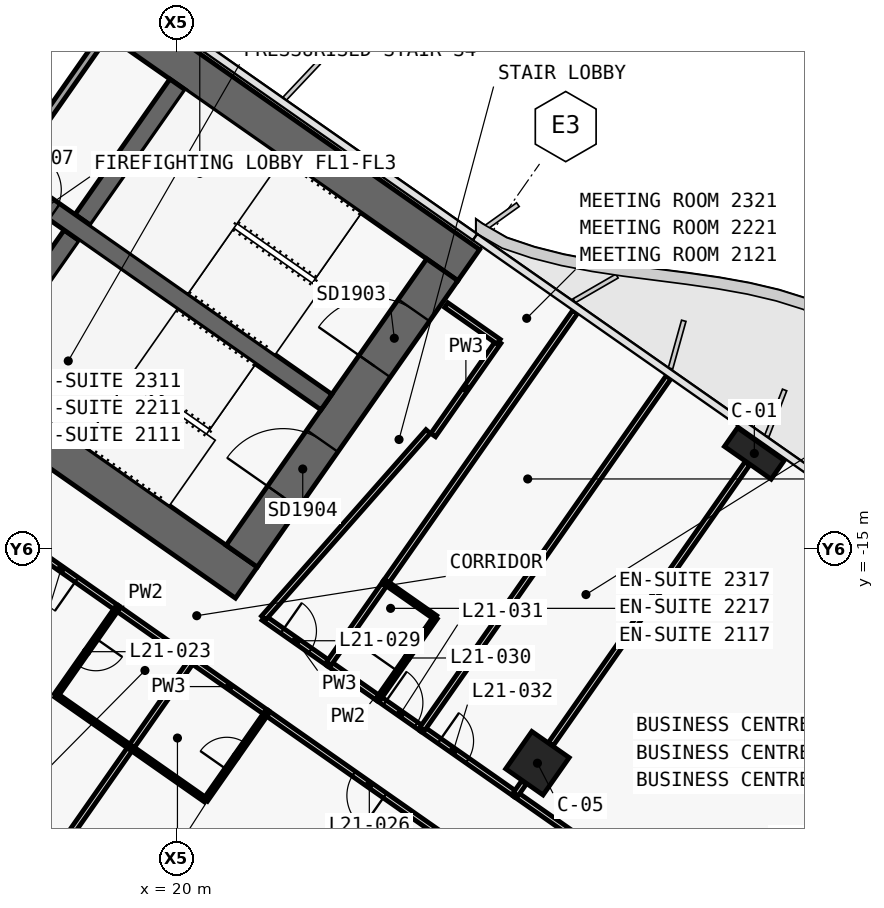
"""IFC4 building model, lengths in metres.
Left out: names, types, materials, properties, quantities, classifications, styles, units other than length and angle.
Written with IfcOpenShell. Run it as: python <this file> out.ifc"""

import sys

from ifc_helpers import new_model, si_unit, direction, frame, frame_2d, origin, origin_2d, place, context, subcontext, project, spatial, polyline, rectangle, outline, extrude, element, fill, save


model = new_model("IFC4")
c1 = context("Model", 3, precision=1e-05, world=origin(), true_north=direction((0.0, 1.0)))
c2 = subcontext(c1, "Body", "Model", "MODEL_VIEW")
j1 = project(units=[si_unit("LENGTHUNIT", "METRE"), si_unit("PLANEANGLEUNIT", "RADIAN")], contexts=[c1])
p1 = place(None, origin())
s1 = spatial("IfcSite", under=j1, at=p1, CompositionType="ELEMENT")
p2 = place(p1, origin())
s2 = spatial("IfcBuilding", under=s1, at=p2, CompositionType="ELEMENT")
p3 = place(p2, frame((0.0, 0.0, 101.3)))
s3 = spatial("IfcBuildingStorey", under=s2, at=p3, CompositionType="ELEMENT", Elevation=101.3)
p4 = place(p3, frame((-0.037, 11.867, 0.0), z_axis=(0.0, 0.0, 1.0), x_axis=(0.819155306259, -0.573571777746, 0.0)))
e1 = element("IfcWall", 1, at=p4, inside=s3, PredefinedType="SHEAR", context=c2, shape_type="SweptSolid", body=[
    extrude(outline(polyline([(33.837, 0.5), (0.0, 0.5), (0.7, -0.5), (33.837, -0.5), (33.837, 0.5)])), origin(), (0.0, 0.0, 1.0), 3.6),
])
p5 = place(p3, frame((-0.037, -0.585, 0.0), z_axis=(0.0, 0.0, 1.0), x_axis=(0.819157152511, -0.573569140985, 0.0)))
e2 = element("IfcWall", 2, at=p5, inside=s3, PredefinedType="SHEAR", context=c2, shape_type="SweptSolid", body=[
    extrude(outline(polyline([(26.695, 0.5), (0.0, 0.5), (0.7, -0.5), (26.695, -0.5), (26.695, 0.5)])), origin(), (0.0, 0.0, 1.0), 3.6),
])
p6 = place(p5, frame((1.045, 0.0, 0.0)))
e3 = element("IfcOpeningElement", 3, at=p6, cuts=e2, PredefinedType="OPENING", context=c2, shape_type="SweptSolid", body=[
    extrude(rectangle(XDim=1.5, YDim=2.1, at=frame_2d((0.75, 1.05))), frame((0.0, 0.51, 0.0), z_axis=(0.0, -1.0, 0.0), x_axis=(1.0, 0.0, 0.0)), (0.0, 0.0, 1.0), 1.02),
])
p7 = place(p5, frame((12.445, 0.0, 0.0)))
e4 = element("IfcOpeningElement", 4, at=p7, cuts=e2, PredefinedType="OPENING", context=c2, shape_type="SweptSolid", body=[
    extrude(rectangle(XDim=1.5, YDim=2.1, at=frame_2d((0.75, 1.05))), frame((0.0, 0.51, 0.0), z_axis=(0.0, -1.0, 0.0), x_axis=(1.0, 0.0, 0.0)), (0.0, 0.0, 1.0), 1.02),
])
p8 = place(p3, frame((21.708, -15.2, 0.0), z_axis=(0.0, 0.0, 1.0), x_axis=(0.573576324356, 0.819152122709, 0.0)))
e5 = element("IfcWall", 5, at=p8, inside=s3, PredefinedType="SHEAR", context=c2, shape_type="SweptSolid", body=[
    extrude(outline(polyline([(9.2, 0.5), (0.0, 0.5), (0.0, -0.5), (9.2, -0.5), (9.2, 0.5)])), origin(), (0.0, 0.0, 1.0), 3.6),
])
p9 = place(p8, frame((6.1, 0.0, 0.0)))
e6 = element("IfcOpeningElement", 6, at=p9, cuts=e5, PredefinedType="OPENING", context=c2, shape_type="SweptSolid", body=[
    extrude(rectangle(XDim=1.8, YDim=2.1, at=frame_2d((0.9, 1.05))), frame((0.0, 0.51, 0.0), z_axis=(0.0, -1.0, 0.0), x_axis=(1.0, 0.0, 0.0)), (0.0, 0.0, 1.0), 1.02),
])
p10 = place(p8, frame((1.9, 0.0, 0.0)))
e7 = element("IfcOpeningElement", 7, at=p10, cuts=e5, PredefinedType="OPENING", context=c2, shape_type="SweptSolid", body=[
    extrude(rectangle(XDim=1.8, YDim=2.1, at=frame_2d((0.9, 1.05))), frame((0.0, 0.51, 0.0), z_axis=(0.0, -1.0, 0.0), x_axis=(1.0, 0.0, 0.0)), (0.0, 0.0, 1.0), 1.02),
])
p11 = place(p3, frame((14.745, -10.324, 0.0), z_axis=(0.0, 0.0, 1.0), x_axis=(0.57356780395, 0.819158088694, 0.0)))
e8 = element("IfcWall", 8, at=p11, inside=s3, PredefinedType="SHEAR", context=c2, shape_type="SweptSolid", body=[
    extrude(outline(polyline([(0.0, 0.25), (0.0, -0.25), (4.35, -0.25), (4.35, 0.25), (0.0, 0.25)])), origin(), (0.0, 0.0, 1.0), 3.6),
])
p12 = place(p3, frame((17.527, -6.352, 0.0), z_axis=(0.0, 0.0, 1.0), x_axis=(0.573530143085, 0.819184457233, 0.0)))
e9 = element("IfcWall", 9, at=p12, inside=s3, PredefinedType="SHEAR", context=c2, shape_type="SweptSolid", body=[
    extrude(outline(polyline([(4.35, -0.25), (4.35, 0.25), (0.0, 0.25), (0.0, -0.25), (4.35, -0.25)])), origin(), (0.0, 0.0, 1.0), 3.6),
])
p13 = place(p3, frame((2.638, 3.768, 0.0), z_axis=(0.0, 0.0, 1.0), x_axis=(0.819148977158, -0.573580816643, 0.0)))
e10 = element("IfcWall", 10, at=p13, inside=s3, PredefinedType="SHEAR", context=c2, shape_type="SweptSolid", body=[
    extrude(outline(polyline([(0.0, 0.25), (0.0, -0.25), (26.0, -0.25), (26.0, 0.25), (0.0, 0.25)])), origin(), (0.0, 0.0, 1.0), 3.6),
])
p14 = place(p13, frame((9.637, 0.0, 0.0)))
e11 = element("IfcOpeningElement", 11, at=p14, cuts=e10, PredefinedType="OPENING", context=c2, shape_type="SweptSolid", body=[
    extrude(rectangle(XDim=1.2, YDim=2.1, at=frame_2d((0.6, 1.05))), frame((0.0, 0.26, 0.0), z_axis=(0.0, -1.0, 0.0), x_axis=(1.0, 0.0, 0.0)), (0.0, 0.0, 1.0), 0.52),
])
p15 = place(p13, frame((11.812, 0.0, 0.0)))
e12 = element("IfcOpeningElement", 12, at=p15, cuts=e10, PredefinedType="OPENING", context=c2, shape_type="SweptSolid", body=[
    extrude(rectangle(XDim=1.2, YDim=2.1, at=frame_2d((0.6, 1.05))), frame((0.0, 0.26, 0.0), z_axis=(0.0, -1.0, 0.0), x_axis=(1.0, 0.0, 0.0)), (0.0, 0.0, 1.0), 0.52),
])
p16 = place(p13, frame((13.988, 0.0, 0.0)))
e13 = element("IfcOpeningElement", 13, at=p16, cuts=e10, PredefinedType="OPENING", context=c2, shape_type="SweptSolid", body=[
    extrude(rectangle(XDim=1.2, YDim=2.1, at=frame_2d((0.6, 1.05))), frame((0.0, 0.26, 0.0), z_axis=(0.0, -1.0, 0.0), x_axis=(1.0, 0.0, 0.0)), (0.0, 0.0, 1.0), 0.52),
])
p17 = place(p13, frame((16.262, 0.0, 0.0)))
e14 = element("IfcOpeningElement", 14, at=p17, cuts=e10, PredefinedType="OPENING", context=c2, shape_type="SweptSolid", body=[
    extrude(rectangle(XDim=1.0, YDim=2.1, at=frame_2d((0.5, 1.05))), frame((0.0, 0.26, 0.0), z_axis=(0.0, -1.0, 0.0), x_axis=(1.0, 0.0, 0.0)), (0.0, 0.0, 1.0), 0.52),
])
p18 = place(p3, frame((35.197, -12.498, 0.0), z_axis=(0.0, 0.0, 1.0), x_axis=(0.819152044289, -0.573576436351, 0.0)))
e15 = element("IfcColumn", 15, at=p18, inside=s3, PredefinedType="COLUMN", context=c2, shape_type="SweptSolid", body=[
    extrude(rectangle(XDim=1.5, YDim=0.6, at=origin_2d()), origin(), (0.0, 0.0, 1.0), 3.6),
])
p19 = place(p3, frame((29.49, -20.649, 0.0), z_axis=(0.0, 0.0, 1.0), x_axis=(0.819152044289, -0.573576436351, 0.0)))
e16 = element("IfcColumn", 16, at=p19, inside=s3, PredefinedType="COLUMN", context=c2, shape_type="SweptSolid", body=[
    extrude(rectangle(XDim=1.2, YDim=1.2, at=origin_2d()), origin(), (0.0, 0.0, 1.0), 3.6),
])
p20 = place(p3, frame((15.622, -5.018, 0.0), z_axis=(0.0, 0.0, 1.0), x_axis=(0.573594173421, 0.819139624372, 0.0)))
e17 = element("IfcWall", 17, at=p20, inside=s3, PredefinedType="SOLIDWALL", context=c2, shape_type="SweptSolid", body=[
    extrude(rectangle(XDim=4.35, YDim=0.2, at=frame_2d((2.175, 0.0))), origin(), (0.0, 0.0, 1.0), 3.6),
])
p21 = place(p3, frame((22.284, -16.824, 0.0), z_axis=(0.0, 0.0, 1.0), x_axis=(0.819160859995, -0.573563846013, 0.0)))
e18 = element("IfcWall", 18, at=p21, inside=s3, PredefinedType="PARTITIONING", context=c2, shape_type="SweptSolid", body=[
    extrude(rectangle(XDim=2.098, YDim=0.15, at=frame_2d((1.049, 0.0))), origin(), (0.0, 0.0, 1.0), 3.32),
])
p22 = place(p21, frame((0.599, 0.0, 0.0)))
e19 = element("IfcOpeningElement", 19, at=p22, cuts=e18, PredefinedType="OPENING", context=c2, shape_type="SweptSolid", body=[
    extrude(rectangle(XDim=0.9, YDim=2.1, at=frame_2d((0.45, 1.05))), frame((0.0, 0.085, 0.0), z_axis=(0.0, -1.0, 0.0), x_axis=(1.0, 0.0, 0.0)), (0.0, 0.0, 1.0), 0.17),
])
p23 = place(p3, frame((25.311, -18.944, 0.0), z_axis=(0.0, 0.0, 1.0), x_axis=(0.819199220913, -0.573509055252, 0.0)))
e20 = element("IfcWall", 20, at=p23, inside=s3, PredefinedType="PARTITIONING", context=c2, shape_type="SweptSolid", body=[
    extrude(rectangle(XDim=1.403, YDim=0.15, at=frame_2d((0.702, 0.0))), origin(), (0.0, 0.0, 1.0), 3.32),
])
p24 = place(p23, frame((0.201, 0.0, 0.0)))
e21 = element("IfcOpeningElement", 21, at=p24, cuts=e20, PredefinedType="OPENING", context=c2, shape_type="SweptSolid", body=[
    extrude(rectangle(XDim=1.0, YDim=2.1, at=frame_2d((0.5, 1.05))), frame((0.0, 0.085, 0.0), z_axis=(0.0, -1.0, 0.0), x_axis=(1.0, 0.0, 0.0)), (0.0, 0.0, 1.0), 0.17),
])
p25 = place(p3, frame((23.999, -18.025, 0.0), z_axis=(0.0, 0.0, 1.0), x_axis=(0.819189013667, -0.573523634986, 0.0)))
e22 = element("IfcWall", 22, at=p25, inside=s3, PredefinedType="PARTITIONING", context=c2, shape_type="SweptSolid", body=[
    extrude(rectangle(XDim=1.604, YDim=0.15, at=frame_2d((0.802, 0.0))), origin(), (0.0, 0.0, 1.0), 3.32),
])
p26 = place(p3, frame((26.457, -19.746, 0.0), z_axis=(0.0, 0.0, 1.0), x_axis=(0.81916700466, -0.573555070134, 0.0)))
e23 = element("IfcWall", 23, at=p26, inside=s3, PredefinedType="PARTITIONING", context=c2, shape_type="SweptSolid", body=[
    extrude(rectangle(XDim=3.004, YDim=0.15, at=frame_2d((1.502, 0.0))), origin(), (0.0, 0.0, 1.0), 2.6),
])
p27 = place(p26, frame((0.552, 0.0, 0.0)))
e24 = element("IfcOpeningElement", 24, at=p27, cuts=e23, PredefinedType="OPENING", context=c2, shape_type="SweptSolid", body=[
    extrude(rectangle(XDim=0.9, YDim=2.1, at=frame_2d((0.45, 1.05))), frame((0.0, 0.085, 0.0), z_axis=(0.0, -1.0, 0.0), x_axis=(1.0, 0.0, 0.0)), (0.0, 0.0, 1.0), 0.17),
])
p28 = place(p3, frame((28.914, -21.467, 0.0), z_axis=(0.0, 0.0, 1.0), x_axis=(0.81915291695, -0.57357519006, 0.0)))
e25 = element("IfcWall", 25, at=p28, inside=s3, PredefinedType="PARTITIONING", context=c2, shape_type="SweptSolid", body=[
    extrude(rectangle(XDim=9.002, YDim=0.15, at=frame_2d((4.501, 0.0))), origin(), (0.0, 0.0, 1.0), 2.5),
])
p29 = place(p28, frame((4.051, 0.0, 0.0)))
e26 = element("IfcOpeningElement", 26, at=p29, cuts=e25, PredefinedType="OPENING", context=c2, shape_type="SweptSolid", body=[
    extrude(rectangle(XDim=0.9, YDim=2.1, at=frame_2d((0.45, 1.05))), frame((0.0, 0.085, 0.0), z_axis=(0.0, -1.0, 0.0), x_axis=(1.0, 0.0, 0.0)), (0.0, 0.0, 1.0), 0.17),
])
p30 = place(p3, frame((18.431, -16.568, 0.0), z_axis=(0.0, 0.0, 1.0), x_axis=(-0.819145961204, 0.573585123798, 0.0)))
e27 = element("IfcWall", 27, at=p30, inside=s3, PredefinedType="PARTITIONING", context=c2, shape_type="SweptSolid", body=[
    extrude(rectangle(XDim=3.603, YDim=0.15, at=frame_2d((1.802, 0.0))), origin(), (0.0, 0.0, 1.0), 3.32),
])
p31 = place(p30, frame((1.301, 0.0, 0.0)))
e28 = element("IfcOpeningElement", 28, at=p31, cuts=e27, PredefinedType="OPENING", context=c2, shape_type="SweptSolid", body=[
    extrude(rectangle(XDim=1.0, YDim=2.1, at=frame_2d((0.5, 1.05))), frame((0.0, 0.085, 0.0), z_axis=(0.0, -1.0, 0.0), x_axis=(1.0, 0.0, 0.0)), (0.0, 0.0, 1.0), 0.17),
])
p32 = place(p3, frame((20.398, -17.945, 0.0), z_axis=(0.0, 0.0, 1.0), x_axis=(-0.819146032251, 0.573585022335, 0.0)))
e29 = element("IfcWall", 29, at=p32, inside=s3, PredefinedType="PARTITIONING", context=c2, shape_type="SweptSolid", body=[
    extrude(rectangle(XDim=2.404, YDim=0.15, at=frame_2d((1.202, 0.0))), origin(), (0.0, 0.0, 1.0), 2.6),
])
p33 = place(p3, frame((27.771, -23.107, 0.0), z_axis=(0.0, 0.0, 1.0), x_axis=(-0.819153746897, 0.573574004767, 0.0)))
e30 = element("IfcWall", 30, at=p33, inside=s3, PredefinedType="PARTITIONING", context=c2, shape_type="SweptSolid", body=[
    extrude(rectangle(XDim=6.603, YDim=0.15, at=frame_2d((3.302, 0.0))), origin(), (0.0, 0.0, 1.0), 2.6),
])
p34 = place(p33, frame((2.802, 0.0, 0.0)))
e31 = element("IfcOpeningElement", 31, at=p34, cuts=e30, PredefinedType="OPENING", context=c2, shape_type="SweptSolid", body=[
    extrude(rectangle(XDim=1.0, YDim=2.1, at=frame_2d((0.5, 1.05))), frame((0.0, 0.085, 0.0), z_axis=(0.0, -1.0, 0.0), x_axis=(1.0, 0.0, 0.0)), (0.0, 0.0, 1.0), 0.17),
])
p35 = place(p3, frame((22.364, -19.322, 0.0), z_axis=(0.0, 0.0, 1.0), x_axis=(-0.819146032251, 0.573585022335, 0.0)))
e32 = element("IfcWall", 32, at=p35, inside=s3, PredefinedType="PARTITIONING", context=c2, shape_type="SweptSolid", body=[
    extrude(rectangle(XDim=2.404, YDim=0.15, at=frame_2d((1.202, 0.0))), origin(), (0.0, 0.0, 1.0), 2.6),
])
p36 = place(p3, frame((30.482, -8.77, 0.0), z_axis=(0.0, 0.0, 1.0), x_axis=(-0.573579093502, -0.819150183725, 0.0)))
e33 = element("IfcWall", 33, at=p36, inside=s3, PredefinedType="PARTITIONING", context=c2, shape_type="SweptSolid", body=[
    extrude(rectangle(XDim=8.701, YDim=0.15, at=frame_2d((4.351, 0.0))), origin(), (0.0, 0.0, 1.0), 2.6),
])
p37 = place(p3, frame((25.493, -15.895, 0.0), z_axis=(0.0, 0.0, 1.0), x_axis=(-0.573588285102, -0.819143747577, 0.0)))
e34 = element("IfcWall", 34, at=p37, inside=s3, PredefinedType="PARTITIONING", context=c2, shape_type="SweptSolid", body=[
    extrude(rectangle(XDim=2.602, YDim=0.15, at=frame_2d((1.301, 0.0))), origin(), (0.0, 0.0, 1.0), 2.6),
])
p38 = place(p3, frame((22.285, -16.825, 0.0), z_axis=(0.0, 0.0, 1.0), x_axis=(0.661551268245, 0.749899939647, 0.0)))
e35 = element("IfcWall", 35, at=p38, inside=s3, PredefinedType="PARTITIONING", context=c2, shape_type="SweptSolid", body=[
    extrude(rectangle(XDim=6.541, YDim=0.15, at=frame_2d((3.271, 0.0))), origin(), (0.0, 0.0, 1.0), 2.6),
])
p39 = place(p3, frame((26.746, -12.014, 0.0), z_axis=(0.0, 0.0, 1.0), x_axis=(0.573560650686, 0.819163097304, 0.0)))
e36 = element("IfcWall", 36, at=p39, inside=s3, PredefinedType="PARTITIONING", context=c2, shape_type="SweptSolid", body=[
    extrude(rectangle(XDim=3.0, YDim=0.15, at=frame_2d((1.5, 0.0))), origin(), (0.0, 0.0, 1.0), 3.32),
])
p40 = place(p3, frame((28.467, -9.556, 0.0), z_axis=(0.0, 0.0, 1.0), x_axis=(-0.819109000826, 0.573637903879, 0.0)))
e37 = element("IfcWall", 37, at=p40, inside=s3, PredefinedType="PARTITIONING", context=c2, shape_type="SweptSolid", body=[
    extrude(rectangle(XDim=1.68, YDim=0.15, at=frame_2d((0.84, 0.0))), origin(), (0.0, 0.0, 1.0), 3.32),
])
p41 = place(p3, frame((25.312, -18.945, 0.0), z_axis=(0.0, 0.0, 1.0), x_axis=(0.573582085028, 0.819148089014, 0.0)))
e38 = element("IfcWall", 38, at=p41, inside=s3, PredefinedType="PARTITIONING", context=c2, shape_type="SweptSolid", body=[
    extrude(rectangle(XDim=2.6, YDim=0.12, at=frame_2d((1.3, 0.0))), origin(), (0.0, 0.0, 1.0), 2.6),
])
p42 = place(p41, frame((0.875, 0.0, 0.0)))
e39 = element("IfcOpeningElement", 39, at=p42, cuts=e38, PredefinedType="OPENING", context=c2, shape_type="SweptSolid", body=[
    extrude(rectangle(XDim=0.85, YDim=2.05, at=frame_2d((0.425, 1.025))), frame((0.0, 0.07, 0.0), z_axis=(0.0, -1.0, 0.0), x_axis=(1.0, 0.0, 0.0)), (0.0, 0.0, 1.0), 0.14),
])
p43 = place(p3, frame((26.803, -16.814, 0.0), z_axis=(0.0, 0.0, 1.0), x_axis=(-0.819059844958, 0.573708088123, 0.0)))
e40 = element("IfcWall", 40, at=p43, inside=s3, PredefinedType="PARTITIONING", context=c2, shape_type="SweptSolid", body=[
    extrude(rectangle(XDim=1.6, YDim=0.12, at=frame_2d((0.8, 0.0))), origin(), (0.0, 0.0, 1.0), 3.32),
])
p44 = place(p3, frame((32.94, -10.491, 0.0), z_axis=(0.0, 0.0, 1.0), x_axis=(-0.573571089604, -0.819155788095, 0.0)))
e41 = element("IfcWall", 41, at=p44, inside=s3, PredefinedType="PARTITIONING", context=c2, shape_type="SweptSolid", body=[
    extrude(rectangle(XDim=11.3, YDim=0.15, at=frame_2d((5.65, 0.0))), origin(), (0.0, 0.0, 1.0), 2.6),
])
p45 = place(p3, frame((35.013, -12.76, 0.0), z_axis=(0.0, 0.0, 1.0), x_axis=(-0.573558725113, -0.819164445546, 0.0)))
e42 = element("IfcWall", 42, at=p45, inside=s3, PredefinedType="PARTITIONING", context=c2, shape_type="SweptSolid", body=[
    extrude(rectangle(XDim=9.01, YDim=0.15, at=frame_2d((4.505, 0.0))), origin(), (0.0, 0.0, 1.0), 2.6),
])
p46 = place(p3, frame((29.134, -21.156, 0.0), z_axis=(0.0, 0.0, 1.0), x_axis=(-0.572944929411, -0.819593867633, 0.0)))
e43 = element("IfcWall", 43, at=p46, inside=s3, PredefinedType="PARTITIONING", context=c2, shape_type="SweptSolid", body=[
    extrude(rectangle(XDim=0.38, YDim=0.15, at=frame_2d((0.19, 0.0))), origin(), (0.0, 0.0, 1.0), 2.6),
])
p47 = place(p3, frame((18.43, -16.567, 0.0), z_axis=(0.0, 0.0, 1.0), x_axis=(-0.573608623498, -0.819129505664, 0.0)))
e44 = element("IfcWall", 44, at=p47, inside=s3, PredefinedType="PARTITIONING", context=c2, shape_type="SweptSolid", body=[
    extrude(rectangle(XDim=2.8, YDim=0.12, at=frame_2d((1.4, 0.0))), origin(), (0.0, 0.0, 1.0), 3.32),
])
p48 = place(p47, frame((0.975, 0.0, 0.0)))
e45 = element("IfcOpeningElement", 45, at=p48, cuts=e44, PredefinedType="OPENING", context=c2, shape_type="SweptSolid", body=[
    extrude(rectangle(XDim=0.85, YDim=2.05, at=frame_2d((0.425, 1.025))), frame((0.0, 0.07, 0.0), z_axis=(0.0, -1.0, 0.0), x_axis=(1.0, 0.0, 0.0)), (0.0, 0.0, 1.0), 0.14),
])
p49 = place(p3, frame((16.824, -18.862, 0.0), z_axis=(0.0, 0.0, 1.0), x_axis=(0.819141114317, -0.573592045652, 0.0)))
e46 = element("IfcWall", 46, at=p49, inside=s3, PredefinedType="PARTITIONING", context=c2, shape_type="SweptSolid", body=[
    extrude(rectangle(XDim=2.4, YDim=0.12, at=frame_2d((1.2, 0.0))), origin(), (0.0, 0.0, 1.0), 2.6),
])
p50 = place(p3, frame((18.79, -20.239, 0.0), z_axis=(0.0, 0.0, 1.0), x_axis=(-0.573594994199, -0.819139049631, 0.0)))
e47 = element("IfcWall", 47, at=p50, inside=s3, PredefinedType="PARTITIONING", context=c2, shape_type="SweptSolid", body=[
    extrude(rectangle(XDim=3.829, YDim=0.15, at=frame_2d((1.915, 0.0))), origin(), (0.0, 0.0, 1.0), 2.6),
])
p51 = place(p3, frame((20.396, -17.944, 0.0), z_axis=(0.0, 0.0, 1.0), x_axis=(-0.57364959175, -0.819100815459, 0.0)))
e48 = element("IfcWall", 48, at=p51, inside=s3, PredefinedType="PARTITIONING", context=c2, shape_type="SweptSolid", body=[
    extrude(rectangle(XDim=2.8, YDim=0.15, at=frame_2d((1.4, 0.0))), origin(), (0.0, 0.0, 1.0), 2.6),
])
p52 = place(p3, frame((18.79, -20.239, 0.0), z_axis=(0.0, 0.0, 1.0), x_axis=(0.819188907105, -0.573523787192, 0.0)))
e49 = element("IfcWall", 49, at=p52, inside=s3, PredefinedType="PARTITIONING", context=c2, shape_type="SweptSolid", body=[
    extrude(rectangle(XDim=2.4, YDim=0.12, at=frame_2d((1.2, 0.0))), origin(), (0.0, 0.0, 1.0), 2.6),
])
p53 = place(p3, frame((20.757, -21.615, 0.0), z_axis=(0.0, 0.0, 1.0), x_axis=(0.57364959175, 0.819100815459, 0.0)))
e50 = element("IfcWall", 50, at=p53, inside=s3, PredefinedType="PARTITIONING", context=c2, shape_type="SweptSolid", body=[
    extrude(rectangle(XDim=2.8, YDim=0.12, at=frame_2d((1.4, 0.0))), origin(), (0.0, 0.0, 1.0), 3.32),
])
p54 = place(p53, frame((0.975, 0.0, 0.0)))
e51 = element("IfcOpeningElement", 51, at=p54, cuts=e50, PredefinedType="OPENING", context=c2, shape_type="SweptSolid", body=[
    extrude(rectangle(XDim=0.85, YDim=2.05, at=frame_2d((0.425, 1.025))), frame((0.0, 0.07, 0.0), z_axis=(0.0, -1.0, 0.0), x_axis=(1.0, 0.0, 0.0)), (0.0, 0.0, 1.0), 0.14),
])
p55 = place(p17, origin())
e52 = element("IfcDoor", 52, at=p55, inside=s3, OperationType="SINGLE_SWING_RIGHT", PredefinedType="DOOR", context=c2, shape_type="SweptSolid", body=[
    extrude(rectangle(XDim=1.0, YDim=2.1, at=frame_2d((0.5, 1.05))), frame((0.0, 0.025, 0.0), z_axis=(0.0, -1.0, 0.0), x_axis=(1.0, 0.0, 0.0)), (0.0, 0.0, 1.0), 0.05),
])
fill(e14, e52)
p56 = place(p9, origin())
e53 = element("IfcDoor", 53, at=p56, inside=s3, OperationType="DOUBLE_DOOR_SINGLE_SWING", PredefinedType="DOOR", context=c2, shape_type="SweptSolid", body=[
    extrude(rectangle(XDim=1.8, YDim=2.1, at=frame_2d((0.9, 1.05))), frame((0.0, 0.025, 0.0), z_axis=(0.0, -1.0, 0.0), x_axis=(1.0, 0.0, 0.0)), (0.0, 0.0, 1.0), 0.05),
])
fill(e6, e53)
p57 = place(p10, origin())
e54 = element("IfcDoor", 54, at=p57, inside=s3, OperationType="DOUBLE_DOOR_SINGLE_SWING", PredefinedType="DOOR", context=c2, shape_type="SweptSolid", body=[
    extrude(rectangle(XDim=1.8, YDim=2.1, at=frame_2d((0.9, 1.05))), frame((0.0, 0.025, 0.0), z_axis=(0.0, -1.0, 0.0), x_axis=(1.0, 0.0, 0.0)), (0.0, 0.0, 1.0), 0.05),
])
fill(e7, e54)
p58 = place(p48, origin())
e55 = element("IfcDoor", 55, at=p58, inside=s3, OperationType="SINGLE_SWING_LEFT", PredefinedType="DOOR", context=c2, shape_type="SweptSolid", body=[
    extrude(rectangle(XDim=0.85, YDim=2.05, at=frame_2d((0.425, 1.025))), frame((0.0, 0.025, 0.0), z_axis=(0.0, -1.0, 0.0), x_axis=(1.0, 0.0, 0.0)), (0.0, 0.0, 1.0), 0.05),
])
fill(e45, e55)
p59 = place(p31, origin())
e56 = element("IfcDoor", 56, at=p59, inside=s3, OperationType="SINGLE_SWING_RIGHT", PredefinedType="DOOR", context=c2, shape_type="SweptSolid", body=[
    extrude(rectangle(XDim=1.0, YDim=2.1, at=frame_2d((0.5, 1.05))), frame((0.0, 0.025, 0.0), z_axis=(0.0, -1.0, 0.0), x_axis=(1.0, 0.0, 0.0)), (0.0, 0.0, 1.0), 0.05),
])
fill(e28, e56)
p60 = place(p54, origin())
e57 = element("IfcDoor", 57, at=p60, inside=s3, OperationType="SINGLE_SWING_LEFT", PredefinedType="DOOR", context=c2, shape_type="SweptSolid", body=[
    extrude(rectangle(XDim=0.85, YDim=2.05, at=frame_2d((0.425, 1.025))), frame((0.0, 0.025, 0.0), z_axis=(0.0, -1.0, 0.0), x_axis=(1.0, 0.0, 0.0)), (0.0, 0.0, 1.0), 0.05),
])
fill(e51, e57)
p61 = place(p34, origin())
e58 = element("IfcDoor", 58, at=p61, inside=s3, OperationType="SINGLE_SWING_LEFT", PredefinedType="DOOR", context=c2, shape_type="SweptSolid", body=[
    extrude(rectangle(XDim=1.0, YDim=2.1, at=frame_2d((0.5, 1.05))), frame((0.0, 0.025, 0.0), z_axis=(0.0, -1.0, 0.0), x_axis=(1.0, 0.0, 0.0)), (0.0, 0.0, 1.0), 0.05),
])
fill(e31, e58)
p62 = place(p22, origin())
e59 = element("IfcDoor", 59, at=p62, inside=s3, OperationType="SINGLE_SWING_LEFT", PredefinedType="DOOR", context=c2, shape_type="SweptSolid", body=[
    extrude(rectangle(XDim=0.9, YDim=2.1, at=frame_2d((0.45, 1.05))), frame((0.0, 0.025, 0.0), z_axis=(0.0, -1.0, 0.0), x_axis=(1.0, 0.0, 0.0)), (0.0, 0.0, 1.0), 0.05),
])
fill(e19, e59)
p63 = place(p42, origin())
e60 = element("IfcDoor", 60, at=p63, inside=s3, OperationType="SINGLE_SWING_LEFT", PredefinedType="DOOR", context=c2, shape_type="SweptSolid", body=[
    extrude(rectangle(XDim=0.85, YDim=2.05, at=frame_2d((0.425, 1.025))), frame((0.0, 0.025, 0.0), z_axis=(0.0, -1.0, 0.0), x_axis=(1.0, 0.0, 0.0)), (0.0, 0.0, 1.0), 0.05),
])
fill(e39, e60)
p64 = place(p24, origin())
e61 = element("IfcDoor", 61, at=p64, inside=s3, OperationType="SINGLE_SWING_RIGHT", PredefinedType="DOOR", context=c2, shape_type="SweptSolid", body=[
    extrude(rectangle(XDim=1.0, YDim=2.1, at=frame_2d((0.5, 1.05))), frame((0.0, 0.025, 0.0), z_axis=(0.0, -1.0, 0.0), x_axis=(1.0, 0.0, 0.0)), (0.0, 0.0, 1.0), 0.05),
])
fill(e21, e61)
p65 = place(p27, origin())
e62 = element("IfcDoor", 62, at=p65, inside=s3, OperationType="SINGLE_SWING_RIGHT", PredefinedType="DOOR", context=c2, shape_type="SweptSolid", body=[
    extrude(rectangle(XDim=0.9, YDim=2.1, at=frame_2d((0.45, 1.05))), frame((0.0, 0.025, 0.0), z_axis=(0.0, -1.0, 0.0), x_axis=(1.0, 0.0, 0.0)), (0.0, 0.0, 1.0), 0.05),
])
fill(e24, e62)
save(model, sys.argv[1])
